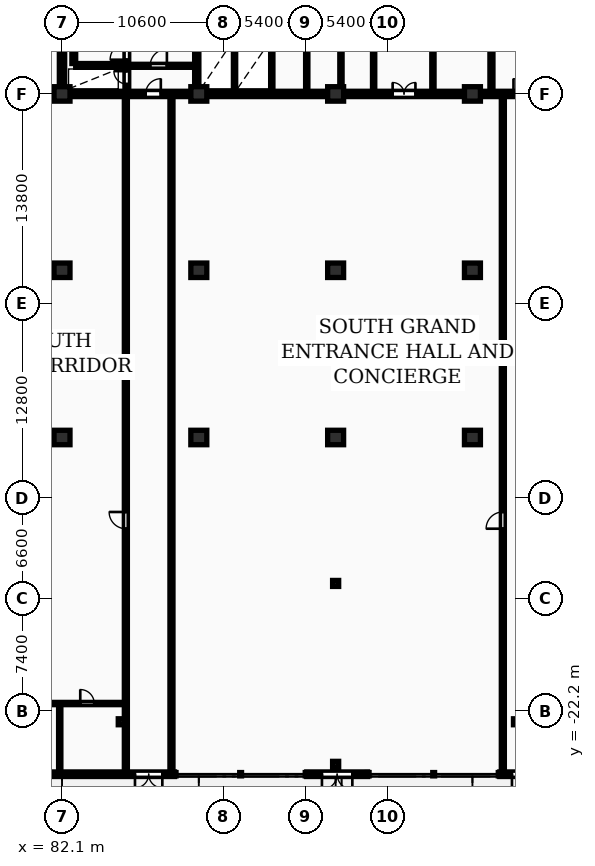
"""IFC4 building model, lengths in metres.
Left out: names, types, materials, properties, quantities, classifications, styles, units other than length and angle.
Written with IfcOpenShell. Run it as: python <this file> out.ifc"""

import sys

from ifc_helpers import new_model, si_unit, direction, frame, frame_2d, origin, origin_2d, place, context, subcontext, project, spatial, rectangle, i_section, extrude, element, fill, save


model = new_model("IFC4")
c1 = context("Model", 3, precision=1e-05, world=origin(), true_north=direction((0.0, 1.0)))
c2 = subcontext(c1, "Body", "Model", "MODEL_VIEW")
j1 = project(units=[si_unit("LENGTHUNIT", "METRE"), si_unit("PLANEANGLEUNIT", "RADIAN")], contexts=[c1])
p1 = place(None, origin())
s1 = spatial("IfcSite", under=j1, at=p1, CompositionType="ELEMENT")
p2 = place(p1, origin())
s2 = spatial("IfcBuilding", under=s1, at=p2, CompositionType="ELEMENT")
p3 = place(p2, origin())
s3 = spatial("IfcBuildingStorey", under=s2, at=p3, CompositionType="ELEMENT", Elevation=0.0)
for number, where, z_axis, x_axis in (
    (1, (82.1, -4.2, 0.0), (0.0, 0.0, 1.0), (1.0, 0.0, 0.0)),
    (2, (82.1, 6.8, 0.0), (0.0, 0.0, 1.0), (1.0, 0.0, 0.0)),
    (3, (82.1, 18.4, 0.0), (0.0, 0.0, 1.0), (1.0, 0.0, 0.0)),
    (4, (91.1, -4.2, 0.0), (0.0, 0.0, 1.0), (1.0, 0.0, 0.0)),
    (5, (91.1, 6.8, 0.0), (0.0, 0.0, 1.0), (1.0, 0.0, 0.0)),
    (6, (91.1, 18.4, 0.0), (0.0, 0.0, 1.0), (1.0, 0.0, 0.0)),
    (7, (100.1, -4.2, 0.0), (0.0, 0.0, 1.0), (1.0, 0.0, 0.0)),
    (8, (100.1, 6.8, 0.0), (0.0, 0.0, 1.0), (1.0, 0.0, 0.0)),
    (9, (100.1, 18.4, 0.0), (0.0, 0.0, 1.0), (1.0, 0.0, 0.0)),
    (10, (109.1, -4.2, 0.0), (0.0, 0.0, 1.0), (1.0, 0.0, 0.0)),
    (11, (109.1, 6.8, 0.0), (0.0, 0.0, 1.0), (1.0, 0.0, 0.0)),
    (12, (109.1, 18.4, 0.0), (0.0, 0.0, 1.0), (1.0, 0.0, 0.0)),
):
    element("IfcColumn", number, at=place(p3, frame(where, z_axis=z_axis, x_axis=x_axis)), inside=s3, PredefinedType="COLUMN", context=c2, shape_type="SweptSolid", body=[
        extrude(rectangle(XDim=1.05, YDim=0.95, at=origin_2d()), origin(), (0.0, 0.0, 1.0), 5.4),
    ])
for number, where, z_axis, x_axis in (
    (13, (100.1, -13.8, 0.0), (0.0, 0.0, 1.0), (1.0, 0.0, 0.0)),
    (14, (86.0, -22.9, 0.0), (0.0, 0.0, 1.0), (1.0, 0.0, 0.0)),
    (15, (112.0, -22.9, 0.0), (0.0, 0.0, 1.0), (1.0, 0.0, 0.0)),
    (16, (100.1, -25.7, 0.0), (0.0, 0.0, 1.0), (1.0, 0.0, 0.0)),
):
    element("IfcColumn", number, at=place(p3, frame(where, z_axis=z_axis, x_axis=x_axis)), inside=s3, PredefinedType="COLUMN", context=c2, shape_type="SweptSolid", body=[
        extrude(i_section(OverallWidth=0.399, OverallDepth=0.394, WebThickness=0.023, FlangeThickness=0.037, FilletRadius=0.015, at=origin_2d()), origin(), (0.0, 0.0, 1.0), 5.4),
    ])
p4 = place(p3, frame((43.5, -26.35, 0.0), z_axis=(0.0, 0.0, 1.0), x_axis=(1.0, 0.0, 0.0)))
e17 = element("IfcWall", 17, at=p4, inside=s3, PredefinedType="STANDARD", context=c2, shape_type="SweptSolid", body=[
    extrude(rectangle(XDim=46.0, YDim=0.3, at=frame_2d((23.0, 0.0))), origin(), (0.0, 0.0, 1.0), 5.1),
])
p5 = place(p4, frame((9.5, 0.0, 0.0)))
e18 = element("IfcOpeningElement", 18, at=p5, cuts=e17, PredefinedType="OPENING", context=c2, shape_type="SweptSolid", body=[
    extrude(rectangle(XDim=2.0, YDim=2.6, at=frame_2d((1.0, 1.3))), frame((0.0, 0.16, 0.0), z_axis=(0.0, -1.0, 0.0), x_axis=(1.0, 0.0, 0.0)), (0.0, 0.0, 1.0), 0.32),
])
p6 = place(p4, frame((24.7, 0.0, 0.0)))
e19 = element("IfcOpeningElement", 19, at=p6, cuts=e17, PredefinedType="OPENING", context=c2, shape_type="SweptSolid", body=[
    extrude(rectangle(XDim=1.8, YDim=2.2, at=frame_2d((0.9, 1.1))), frame((0.0, 0.16, 0.0), z_axis=(0.0, -1.0, 0.0), x_axis=(1.0, 0.0, 0.0)), (0.0, 0.0, 1.0), 0.32),
])
p7 = place(p4, frame((43.4, 0.0, 0.0)))
e20 = element("IfcOpeningElement", 20, at=p7, cuts=e17, PredefinedType="OPENING", context=c2, shape_type="SweptSolid", body=[
    extrude(rectangle(XDim=1.8, YDim=2.2, at=frame_2d((0.9, 1.1))), frame((0.0, 0.16, 0.0), z_axis=(0.0, -1.0, 0.0), x_axis=(1.0, 0.0, 0.0)), (0.0, 0.0, 1.0), 0.32),
])
p8 = place(p3, frame((98.2, -26.35, 0.0), z_axis=(0.0, 0.0, 1.0), x_axis=(1.0, 0.0, 0.0)))
e21 = element("IfcWall", 21, at=p8, inside=s3, PredefinedType="STANDARD", context=c2, shape_type="SweptSolid", body=[
    extrude(rectangle(XDim=4.0, YDim=0.3, at=frame_2d((2.0, 0.0))), origin(), (0.0, 0.0, 1.0), 5.1),
])
p9 = place(p8, frame((1.0, 0.0, 0.0)))
e22 = element("IfcOpeningElement", 22, at=p9, cuts=e21, PredefinedType="OPENING", context=c2, shape_type="SweptSolid", body=[
    extrude(rectangle(XDim=2.0, YDim=2.6, at=frame_2d((1.0, 1.3))), frame((0.0, 0.16, 0.0), z_axis=(0.0, -1.0, 0.0), x_axis=(1.0, 0.0, 0.0)), (0.0, 0.0, 1.0), 0.32),
])
p10 = place(p3, frame((110.9, -26.35, 0.0), z_axis=(0.0, 0.0, 1.0), x_axis=(1.0, 0.0, 0.0)))
e23 = element("IfcWall", 23, at=p10, inside=s3, PredefinedType="STANDARD", context=c2, shape_type="SweptSolid", body=[
    extrude(rectangle(XDim=42.6, YDim=0.3, at=frame_2d((21.3, 0.0))), origin(), (0.0, 0.0, 1.0), 5.1),
])
p11 = place(p10, frame((0.8, 0.0, 0.0)))
e24 = element("IfcOpeningElement", 24, at=p11, cuts=e23, PredefinedType="OPENING", context=c2, shape_type="SweptSolid", body=[
    extrude(rectangle(XDim=1.8, YDim=2.2, at=frame_2d((0.9, 1.1))), frame((0.0, 0.16, 0.0), z_axis=(0.0, -1.0, 0.0), x_axis=(1.0, 0.0, 0.0)), (0.0, 0.0, 1.0), 0.32),
])
p12 = place(p10, frame((6.2, 0.0, 0.0)))
e25 = element("IfcOpeningElement", 25, at=p12, cuts=e23, PredefinedType="OPENING", context=c2, shape_type="SweptSolid", body=[
    extrude(rectangle(XDim=1.8, YDim=2.2, at=frame_2d((0.9, 1.1))), frame((0.0, 0.16, 0.0), z_axis=(0.0, -1.0, 0.0), x_axis=(1.0, 0.0, 0.0)), (0.0, 0.0, 1.0), 0.32),
])
p13 = place(p10, frame((16.0, 0.0, 0.0)))
e26 = element("IfcOpeningElement", 26, at=p13, cuts=e23, PredefinedType="OPENING", context=c2, shape_type="SweptSolid", body=[
    extrude(rectangle(XDim=2.0, YDim=2.6, at=frame_2d((1.0, 1.3))), frame((0.0, 0.16, 0.0), z_axis=(0.0, -1.0, 0.0), x_axis=(1.0, 0.0, 0.0)), (0.0, 0.0, 1.0), 0.32),
])
p14 = place(p10, frame((31.0, 0.0, 0.0)))
e27 = element("IfcOpeningElement", 27, at=p14, cuts=e23, PredefinedType="OPENING", context=c2, shape_type="SweptSolid", body=[
    extrude(rectangle(XDim=2.0, YDim=2.6, at=frame_2d((1.0, 1.3))), frame((0.0, 0.16, 0.0), z_axis=(0.0, -1.0, 0.0), x_axis=(1.0, 0.0, 0.0)), (0.0, 0.0, 1.0), 0.32),
])
p15 = place(p10, frame((24.0, 0.0, 0.9)))
e28 = element("IfcOpeningElement", 28, at=p15, cuts=e23, PredefinedType="OPENING", context=c2, shape_type="SweptSolid", body=[
    extrude(rectangle(XDim=3.0, YDim=2.6, at=frame_2d((1.5, 1.3))), frame((0.0, 0.16, 0.0), z_axis=(0.0, -1.0, 0.0), x_axis=(1.0, 0.0, 0.0)), (0.0, 0.0, 1.0), 0.32),
])
p16 = place(p3, frame((82.1, 18.575, 0.0), z_axis=(0.0, 0.0, 1.0), x_axis=(0.0, 1.0, 0.0)))
e29 = element("IfcWall", 29, at=p16, inside=s3, PredefinedType="SHEAR", context=c2, shape_type="SweptSolid", body=[
    extrude(rectangle(XDim=11.65, YDim=0.35, at=frame_2d((5.825, 0.0))), origin(), (0.0, 0.0, 1.0), 5.4),
])
p17 = place(p3, frame((81.925, 18.4, 0.0), z_axis=(0.0, 0.0, 1.0), x_axis=(1.0, 0.0, 0.0)))
e30 = element("IfcWall", 30, at=p17, inside=s3, PredefinedType="SHEAR", context=c2, shape_type="SweptSolid", body=[
    extrude(rectangle(XDim=36.265, YDim=0.35, at=frame_2d((18.132, 0.0))), origin(), (0.0, 0.0, 1.0), 5.4),
])
p18 = place(p17, frame((5.675, 0.0, 0.0)))
e31 = element("IfcOpeningElement", 31, at=p18, cuts=e30, PredefinedType="OPENING", context=c2, shape_type="SweptSolid", body=[
    extrude(rectangle(XDim=1.0, YDim=2.15, at=frame_2d((0.5, 1.075))), frame((0.0, 0.185, 0.0), z_axis=(0.0, -1.0, 0.0), x_axis=(1.0, 0.0, 0.0)), (0.0, 0.0, 1.0), 0.37),
])
p19 = place(p17, frame((21.925, 0.0, 0.0)))
e32 = element("IfcOpeningElement", 32, at=p19, cuts=e30, PredefinedType="OPENING", context=c2, shape_type="SweptSolid", body=[
    extrude(rectangle(XDim=1.5, YDim=2.2, at=frame_2d((0.75, 1.1))), frame((0.0, 0.185, 0.0), z_axis=(0.0, -1.0, 0.0), x_axis=(1.0, 0.0, 0.0)), (0.0, 0.0, 1.0), 0.37),
])
p20 = place(p17, frame((29.875, 0.0, 0.0)))
e33 = element("IfcOpeningElement", 33, at=p20, cuts=e30, PredefinedType="OPENING", context=c2, shape_type="SweptSolid", body=[
    extrude(rectangle(XDim=1.0, YDim=2.15, at=frame_2d((0.5, 1.075))), frame((0.0, 0.185, 0.0), z_axis=(0.0, -1.0, 0.0), x_axis=(1.0, 0.0, 0.0)), (0.0, 0.0, 1.0), 0.37),
])
p21 = place(p3, frame((82.875, 20.4, 0.0), z_axis=(0.0, 0.0, 1.0), x_axis=(0.0, 1.0, 0.0)))
e34 = element("IfcWall", 34, at=p21, inside=s3, PredefinedType="SHEAR", context=c2, shape_type="SweptSolid", body=[
    extrude(rectangle(XDim=7.6, YDim=0.25, at=frame_2d((3.8, 0.0))), origin(), (0.0, 0.0, 1.0), 5.4),
])
p22 = place(p3, frame((86.365, 18.6, 0.0), z_axis=(0.0, 0.0, 1.0), x_axis=(0.0, 1.0, 0.0)))
e35 = element("IfcWall", 35, at=p22, inside=s3, PredefinedType="SHEAR", context=c2, shape_type="SweptSolid", body=[
    extrude(rectangle(XDim=11.6, YDim=0.25, at=frame_2d((5.8, 0.0))), origin(), (0.0, 0.0, 1.0), 5.4),
])
p23 = place(p22, frame((0.45, 0.0, 0.0)))
e36 = element("IfcOpeningElement", 36, at=p23, cuts=e35, PredefinedType="OPENING", context=c2, shape_type="SweptSolid", body=[
    extrude(rectangle(XDim=0.85, YDim=2.05, at=frame_2d((0.425, 1.025))), frame((0.0, 0.135, 0.0), z_axis=(0.0, -1.0, 0.0), x_axis=(1.0, 0.0, 0.0)), (0.0, 0.0, 1.0), 0.27),
])
p24 = place(p22, frame((2.05, 0.0, 0.0)))
e37 = element("IfcOpeningElement", 37, at=p24, cuts=e35, PredefinedType="OPENING", context=c2, shape_type="SweptSolid", body=[
    extrude(rectangle(XDim=1.1, YDim=2.1, at=frame_2d((0.55, 1.05))), frame((0.0, 0.135, 0.0), z_axis=(0.0, -1.0, 0.0), x_axis=(1.0, 0.0, 0.0)), (0.0, 0.0, 1.0), 0.27),
])
p25 = place(p22, frame((9.95, 0.0, 0.0)))
e38 = element("IfcOpeningElement", 38, at=p25, cuts=e35, PredefinedType="OPENING", context=c2, shape_type="SweptSolid", body=[
    extrude(rectangle(XDim=0.85, YDim=2.05, at=frame_2d((0.425, 1.025))), frame((0.0, 0.135, 0.0), z_axis=(0.0, -1.0, 0.0), x_axis=(1.0, 0.0, 0.0)), (0.0, 0.0, 1.0), 0.27),
])
p26 = place(p3, frame((83.0, 20.275, 0.0), z_axis=(0.0, 0.0, 1.0), x_axis=(1.0, 0.0, 0.0)))
e39 = element("IfcWall", 39, at=p26, inside=s3, PredefinedType="SHEAR", context=c2, shape_type="SweptSolid", body=[
    extrude(rectangle(XDim=3.24, YDim=0.25, at=frame_2d((1.62, 0.0))), origin(), (0.0, 0.0, 1.0), 5.4),
])
p27 = place(p3, frame((86.5, 20.25, 0.0), z_axis=(0.0, 0.0, 1.0), x_axis=(1.0, 0.0, 0.0)))
e40 = element("IfcWall", 40, at=p27, inside=s3, PredefinedType="PARTITIONING", context=c2, shape_type="SweptSolid", body=[
    extrude(rectangle(XDim=4.32, YDim=0.2, at=frame_2d((2.16, 0.0))), origin(), (0.0, 0.0, 1.0), 5.1),
])
p28 = place(p27, frame((1.4, 0.0, 0.0)))
e41 = element("IfcOpeningElement", 41, at=p28, cuts=e40, PredefinedType="OPENING", context=c2, shape_type="SweptSolid", body=[
    extrude(rectangle(XDim=1.1, YDim=2.1, at=frame_2d((0.55, 1.05))), frame((0.0, 0.11, 0.0), z_axis=(0.0, -1.0, 0.0), x_axis=(1.0, 0.0, 0.0)), (0.0, 0.0, 1.0), 0.22),
])
p29 = place(p3, frame((90.95, 18.6, 0.0), z_axis=(0.0, 0.0, 1.0), x_axis=(0.0, 1.0, 0.0)))
e42 = element("IfcWall", 42, at=p29, inside=s3, PredefinedType="SHEAR", context=c2, shape_type="SweptSolid", body=[
    extrude(rectangle(XDim=11.6, YDim=0.25, at=frame_2d((5.8, 0.0))), origin(), (0.0, 0.0, 1.0), 5.4),
])
p30 = place(p29, frame((4.6, 0.0, 0.0)))
e43 = element("IfcOpeningElement", 43, at=p30, cuts=e42, PredefinedType="OPENING", context=c2, shape_type="SweptSolid", body=[
    extrude(rectangle(XDim=1.1, YDim=2.1, at=frame_2d((0.55, 1.05))), frame((0.0, 0.135, 0.0), z_axis=(0.0, -1.0, 0.0), x_axis=(1.0, 0.0, 0.0)), (0.0, 0.0, 1.0), 0.27),
])
for number, where, z_axis, x_axis in (
    (44, (93.45, 18.6, 0.0), (0.0, 0.0, 1.0), (0.0, 1.0, 0.0)),
    (45, (95.9, 18.6, 0.0), (0.0, 0.0, 1.0), (0.0, 1.0, 0.0)),
    (46, (98.2, 18.6, 0.0), (0.0, 0.0, 1.0), (0.0, 1.0, 0.0)),
):
    element("IfcWall", number, at=place(p3, frame(where, z_axis=z_axis, x_axis=x_axis)), inside=s3, PredefinedType="PARTITIONING", context=c2, shape_type="SweptSolid", body=[
        extrude(rectangle(XDim=3.6, YDim=0.15, at=frame_2d((1.8, 0.0))), origin(), (0.0, 0.0, 1.0), 5.1),
    ])
p31 = place(p3, frame((100.45, 18.6, 0.0), z_axis=(0.0, 0.0, 1.0), x_axis=(0.0, 1.0, 0.0)))
e47 = element("IfcWall", 47, at=p31, inside=s3, PredefinedType="PARTITIONING", context=c2, shape_type="SweptSolid", body=[
    extrude(rectangle(XDim=3.6, YDim=0.15, at=frame_2d((1.8, 0.0))), origin(), (0.0, 0.0, 1.0), 4.35),
])
for number, where, z_axis, x_axis in (
    (48, (102.6, 18.6, 0.0), (0.0, 0.0, 1.0), (0.0, 1.0, 0.0)),
    (49, (106.5, 18.6, 0.0), (0.0, 0.0, 1.0), (0.0, 1.0, 0.0)),
):
    element("IfcWall", number, at=place(p3, frame(where, z_axis=z_axis, x_axis=x_axis)), inside=s3, PredefinedType="PARTITIONING", context=c2, shape_type="SweptSolid", body=[
        extrude(rectangle(XDim=3.6, YDim=0.15, at=frame_2d((1.8, 0.0))), origin(), (0.0, 0.0, 1.0), 5.1),
    ])
p32 = place(p3, frame((110.35, 18.6, 0.0), z_axis=(0.0, 0.0, 1.0), x_axis=(0.0, 1.0, 0.0)))
e50 = element("IfcWall", 50, at=p32, inside=s3, PredefinedType="PARTITIONING", context=c2, shape_type="SweptSolid", body=[
    extrude(rectangle(XDim=11.6, YDim=0.2, at=frame_2d((5.8, 0.0))), origin(), (0.0, 0.0, 1.0), 5.1),
])
p33 = place(p32, frame((5.2, 0.0, 0.0)))
e51 = element("IfcOpeningElement", 51, at=p33, cuts=e50, PredefinedType="OPENING", context=c2, shape_type="SweptSolid", body=[
    extrude(rectangle(XDim=1.1, YDim=2.15, at=frame_2d((0.55, 1.075))), frame((0.0, 0.11, 0.0), z_axis=(0.0, -1.0, 0.0), x_axis=(1.0, 0.0, 0.0)), (0.0, 0.0, 1.0), 0.22),
])
p34 = place(p3, frame((86.3, -26.2, 0.0), z_axis=(0.0, 0.0, 1.0), x_axis=(0.0, 1.0, 0.0)))
e52 = element("IfcWall", 52, at=p34, inside=s3, PredefinedType="PARTITIONING", context=c2, shape_type="SweptSolid", body=[
    extrude(rectangle(XDim=44.35, YDim=0.2, at=frame_2d((22.175, 0.0))), origin(), (0.0, 0.0, 1.0), 5.1),
])
p35 = place(p34, frame((16.0, 0.0, 0.0)))
e53 = element("IfcOpeningElement", 53, at=p35, cuts=e52, PredefinedType="OPENING", context=c2, shape_type="SweptSolid", body=[
    extrude(rectangle(XDim=1.1, YDim=2.1, at=frame_2d((0.55, 1.05))), frame((0.0, 0.11, 0.0), z_axis=(0.0, -1.0, 0.0), x_axis=(1.0, 0.0, 0.0)), (0.0, 0.0, 1.0), 0.22),
])
p36 = place(p3, frame((89.3, -26.2, 0.0), z_axis=(0.0, 0.0, 1.0), x_axis=(0.0, 1.0, 0.0)))
e54 = element("IfcWall", 54, at=p36, inside=s3, PredefinedType="PARTITIONING", context=c2, shape_type="SweptSolid", body=[
    extrude(rectangle(XDim=44.35, YDim=0.2, at=frame_2d((22.175, 0.0))), origin(), (0.0, 0.0, 1.0), 5.1),
])
p37 = place(p3, frame((111.1, -26.2, 0.0), z_axis=(0.0, 0.0, 1.0), x_axis=(0.0, 1.0, 0.0)))
e55 = element("IfcWall", 55, at=p37, inside=s3, PredefinedType="PARTITIONING", context=c2, shape_type="SweptSolid", body=[
    extrude(rectangle(XDim=44.35, YDim=0.2, at=frame_2d((22.175, 0.0))), origin(), (0.0, 0.0, 1.0), 5.1),
])
p38 = place(p37, frame((16.0, 0.0, 0.0)))
e56 = element("IfcOpeningElement", 56, at=p38, cuts=e55, PredefinedType="OPENING", context=c2, shape_type="SweptSolid", body=[
    extrude(rectangle(XDim=1.1, YDim=2.1, at=frame_2d((0.55, 1.05))), frame((0.0, 0.11, 0.0), z_axis=(0.0, -1.0, 0.0), x_axis=(1.0, 0.0, 0.0)), (0.0, 0.0, 1.0), 0.22),
])
p39 = place(p3, frame((72.7, -21.7, 0.0), z_axis=(0.0, 0.0, 1.0), x_axis=(1.0, 0.0, 0.0)))
e57 = element("IfcWall", 57, at=p39, inside=s3, PredefinedType="PARTITIONING", context=c2, shape_type="SweptSolid", body=[
    extrude(rectangle(XDim=13.5, YDim=0.15, at=frame_2d((6.75, 0.0))), origin(), (0.0, 0.0, 1.0), 5.1),
])
p40 = place(p39, frame((1.8, 0.0, 0.0)))
e58 = element("IfcOpeningElement", 58, at=p40, cuts=e57, PredefinedType="OPENING", context=c2, shape_type="SweptSolid", body=[
    extrude(rectangle(XDim=0.96, YDim=2.1, at=frame_2d((0.48, 1.05))), frame((0.0, 0.085, 0.0), z_axis=(0.0, -1.0, 0.0), x_axis=(1.0, 0.0, 0.0)), (0.0, 0.0, 1.0), 0.17),
])
p41 = place(p39, frame((6.4, 0.0, 0.0)))
e59 = element("IfcOpeningElement", 59, at=p41, cuts=e57, PredefinedType="OPENING", context=c2, shape_type="SweptSolid", body=[
    extrude(rectangle(XDim=0.92, YDim=2.08, at=frame_2d((0.46, 1.04))), frame((0.0, 0.085, 0.0), z_axis=(0.0, -1.0, 0.0), x_axis=(1.0, 0.0, 0.0)), (0.0, 0.0, 1.0), 0.17),
])
p42 = place(p39, frame((10.6, 0.0, 0.0)))
e60 = element("IfcOpeningElement", 60, at=p42, cuts=e57, PredefinedType="OPENING", context=c2, shape_type="SweptSolid", body=[
    extrude(rectangle(XDim=0.92, YDim=2.08, at=frame_2d((0.46, 1.04))), frame((0.0, 0.085, 0.0), z_axis=(0.0, -1.0, 0.0), x_axis=(1.0, 0.0, 0.0)), (0.0, 0.0, 1.0), 0.17),
])
p43 = place(p3, frame((81.95, -26.2, 0.0), z_axis=(0.0, 0.0, 1.0), x_axis=(0.0, 1.0, 0.0)))
e61 = element("IfcWall", 61, at=p43, inside=s3, PredefinedType="PARTITIONING", context=c2, shape_type="SweptSolid", body=[
    extrude(rectangle(XDim=4.4, YDim=0.15, at=frame_2d((2.2, 0.0))), origin(), (0.0, 0.0, 1.0), 5.1),
])
p44 = place(p7, frame((1.8, 0.0, 0.0), z_axis=(0.0, 0.0, 1.0), x_axis=(-1.0, 0.0, 0.0)))
e62 = element("IfcDoor", 62, at=p44, inside=s3, OperationType="DOUBLE_DOOR_SINGLE_SWING", PredefinedType="DOOR", context=c2, shape_type="SweptSolid", body=[
    extrude(rectangle(XDim=1.8, YDim=2.2, at=frame_2d((0.9, 1.1))), frame((0.0, 0.025, 0.0), z_axis=(0.0, -1.0, 0.0), x_axis=(1.0, 0.0, 0.0)), (0.0, 0.0, 1.0), 0.05),
])
fill(e20, e62)
p45 = place(p9, frame((2.0, 0.0, 0.0), z_axis=(0.0, 0.0, 1.0), x_axis=(-1.0, 0.0, 0.0)))
e63 = element("IfcDoor", 63, at=p45, inside=s3, OperationType="DOUBLE_DOOR_SINGLE_SWING", PredefinedType="DOOR", context=c2, shape_type="SweptSolid", body=[
    extrude(rectangle(XDim=2.0, YDim=2.6, at=frame_2d((1.0, 1.3))), frame((0.0, 0.025, 0.0), z_axis=(0.0, -1.0, 0.0), x_axis=(1.0, 0.0, 0.0)), (0.0, 0.0, 1.0), 0.05),
])
fill(e22, e63)
p46 = place(p11, frame((1.8, 0.0, 0.0), z_axis=(0.0, 0.0, 1.0), x_axis=(-1.0, 0.0, 0.0)))
e64 = element("IfcDoor", 64, at=p46, inside=s3, OperationType="DOUBLE_DOOR_SINGLE_SWING", PredefinedType="DOOR", context=c2, shape_type="SweptSolid", body=[
    extrude(rectangle(XDim=1.8, YDim=2.2, at=frame_2d((0.9, 1.1))), frame((0.0, 0.025, 0.0), z_axis=(0.0, -1.0, 0.0), x_axis=(1.0, 0.0, 0.0)), (0.0, 0.0, 1.0), 0.05),
])
fill(e24, e64)
p47 = place(p18, origin())
e65 = element("IfcDoor", 65, at=p47, inside=s3, OperationType="SINGLE_SWING_RIGHT", PredefinedType="DOOR", context=c2, shape_type="SweptSolid", body=[
    extrude(rectangle(XDim=1.0, YDim=2.15, at=frame_2d((0.5, 1.075))), frame((0.0, 0.025, 0.0), z_axis=(0.0, -1.0, 0.0), x_axis=(1.0, 0.0, 0.0)), (0.0, 0.0, 1.0), 0.05),
])
fill(e31, e65)
p48 = place(p19, origin())
e66 = element("IfcDoor", 66, at=p48, inside=s3, OperationType="DOUBLE_DOOR_SINGLE_SWING", PredefinedType="DOOR", context=c2, shape_type="SweptSolid", body=[
    extrude(rectangle(XDim=1.5, YDim=2.2, at=frame_2d((0.75, 1.1))), frame((0.0, 0.025, 0.0), z_axis=(0.0, -1.0, 0.0), x_axis=(1.0, 0.0, 0.0)), (0.0, 0.0, 1.0), 0.05),
])
fill(e32, e66)
p49 = place(p20, origin())
e67 = element("IfcDoor", 67, at=p49, inside=s3, OperationType="SINGLE_SWING_LEFT", PredefinedType="DOOR", context=c2, shape_type="SweptSolid", body=[
    extrude(rectangle(XDim=1.0, YDim=2.15, at=frame_2d((0.5, 1.075))), frame((0.0, 0.025, 0.0), z_axis=(0.0, -1.0, 0.0), x_axis=(1.0, 0.0, 0.0)), (0.0, 0.0, 1.0), 0.05),
])
fill(e33, e67)
p50 = place(p23, origin())
e68 = element("IfcDoor", 68, at=p50, inside=s3, OperationType="SINGLE_SWING_RIGHT", PredefinedType="DOOR", context=c2, shape_type="SweptSolid", body=[
    extrude(rectangle(XDim=0.85, YDim=2.05, at=frame_2d((0.425, 1.025))), frame((0.0, 0.025, 0.0), z_axis=(0.0, -1.0, 0.0), x_axis=(1.0, 0.0, 0.0)), (0.0, 0.0, 1.0), 0.05),
])
fill(e36, e68)
p51 = place(p24, origin())
e69 = element("IfcDoor", 69, at=p51, inside=s3, OperationType="SINGLE_SWING_LEFT", PredefinedType="DOOR", context=c2, shape_type="SweptSolid", body=[
    extrude(rectangle(XDim=1.1, YDim=2.1, at=frame_2d((0.55, 1.05))), frame((0.0, 0.025, 0.0), z_axis=(0.0, -1.0, 0.0), x_axis=(1.0, 0.0, 0.0)), (0.0, 0.0, 1.0), 0.05),
])
fill(e37, e69)
p52 = place(p28, origin())
e70 = element("IfcDoor", 70, at=p52, inside=s3, OperationType="SINGLE_SWING_RIGHT", PredefinedType="DOOR", context=c2, shape_type="SweptSolid", body=[
    extrude(rectangle(XDim=1.1, YDim=2.1, at=frame_2d((0.55, 1.05))), frame((0.0, 0.025, 0.0), z_axis=(0.0, -1.0, 0.0), x_axis=(1.0, 0.0, 0.0)), (0.0, 0.0, 1.0), 0.05),
])
fill(e41, e70)
p53 = place(p35, origin())
e71 = element("IfcDoor", 71, at=p53, inside=s3, OperationType="SINGLE_SWING_RIGHT", PredefinedType="DOOR", context=c2, shape_type="SweptSolid", body=[
    extrude(rectangle(XDim=1.1, YDim=2.1, at=frame_2d((0.55, 1.05))), frame((0.0, 0.025, 0.0), z_axis=(0.0, -1.0, 0.0), x_axis=(1.0, 0.0, 0.0)), (0.0, 0.0, 1.0), 0.05),
])
fill(e53, e71)
p54 = place(p38, origin())
e72 = element("IfcDoor", 72, at=p54, inside=s3, OperationType="SINGLE_SWING_LEFT", PredefinedType="DOOR", context=c2, shape_type="SweptSolid", body=[
    extrude(rectangle(XDim=1.1, YDim=2.1, at=frame_2d((0.55, 1.05))), frame((0.0, 0.025, 0.0), z_axis=(0.0, -1.0, 0.0), x_axis=(1.0, 0.0, 0.0)), (0.0, 0.0, 1.0), 0.05),
])
fill(e56, e72)
p55 = place(p42, origin())
e73 = element("IfcDoor", 73, at=p55, inside=s3, OperationType="SINGLE_SWING_LEFT", PredefinedType="DOOR", context=c2, shape_type="SweptSolid", body=[
    extrude(rectangle(XDim=0.92, YDim=2.08, at=frame_2d((0.46, 1.04))), frame((0.0, 0.025, 0.0), z_axis=(0.0, -1.0, 0.0), x_axis=(1.0, 0.0, 0.0)), (0.0, 0.0, 1.0), 0.05),
])
fill(e60, e73)
save(model, sys.argv[1])
